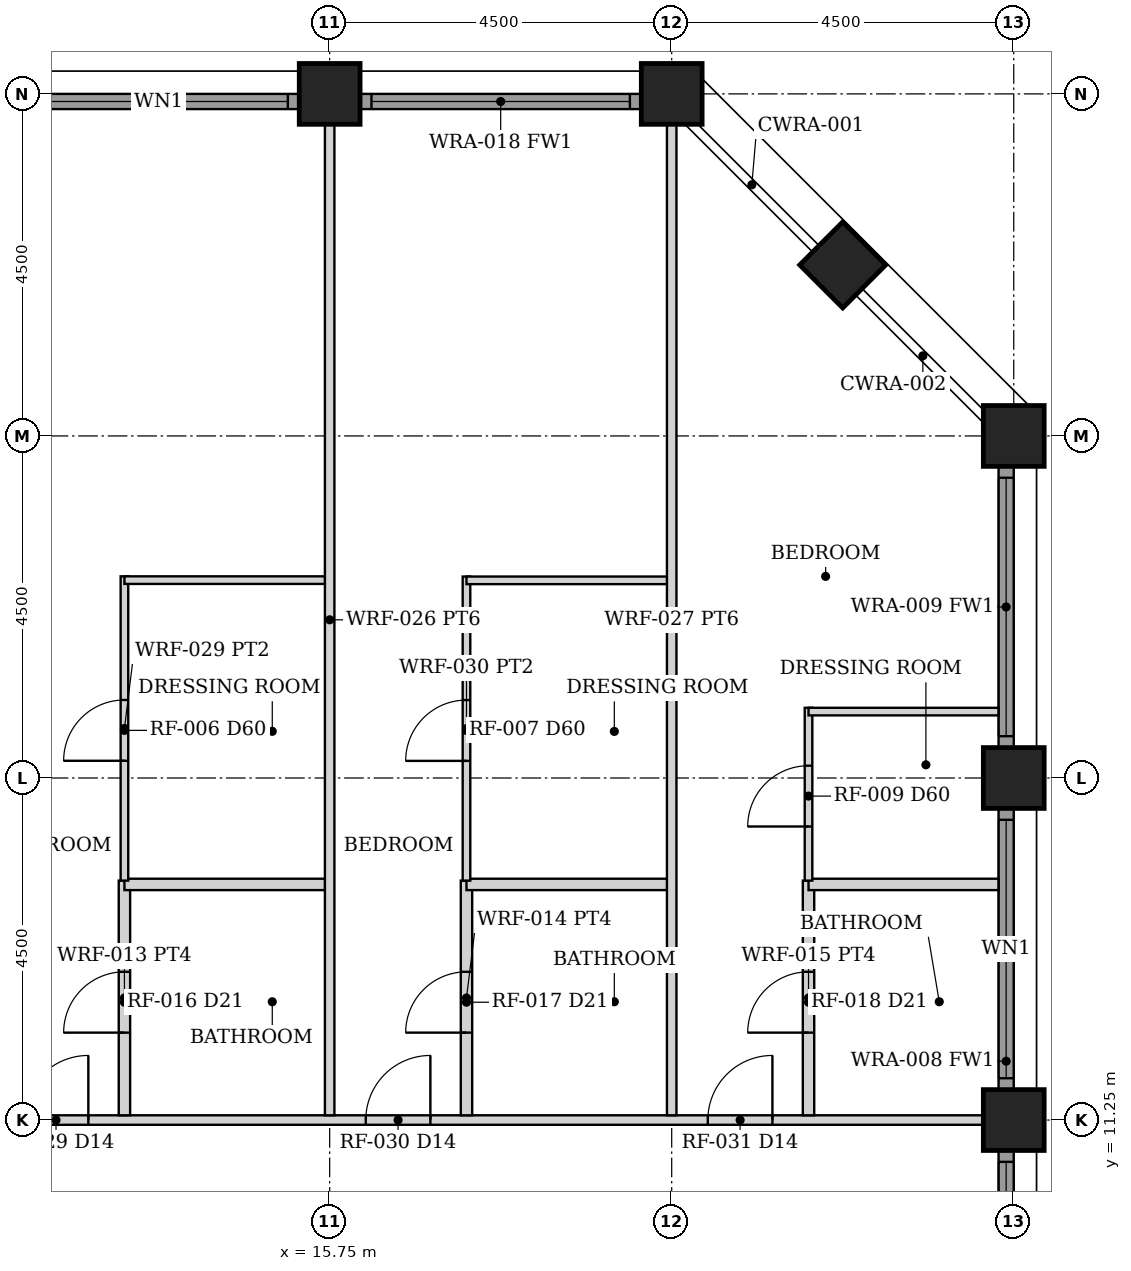
"""IFC4 building model, lengths in metres.
Left out: names, types, materials, properties, quantities, classifications, styles, units other than length and angle.
Written with IfcOpenShell. Run it as: python <this file> out.ifc"""

import sys

from ifc_helpers import new_model, si_unit, direction, frame, frame_2d, origin, origin_2d, place, context, subcontext, project, spatial, rectangle, hollow_rectangle, extrude, element, fill, save


model = new_model("IFC4")
c1 = context("Model", 3, precision=1e-05, world=origin(), true_north=direction((0.0, 1.0)))
c2 = subcontext(c1, "Body", "Model", "MODEL_VIEW")
j1 = project(units=[si_unit("LENGTHUNIT", "METRE"), si_unit("PLANEANGLEUNIT", "RADIAN")], contexts=[c1])
p1 = place(None, origin())
s1 = spatial("IfcSite", under=j1, at=p1, CompositionType="ELEMENT")
p2 = place(p1, origin())
s2 = spatial("IfcBuilding", under=s1, at=p2, CompositionType="ELEMENT")
p3 = place(p2, frame((0.0, 0.0, 79.0)))
s3 = spatial("IfcBuildingStorey", under=s2, at=p3, CompositionType="ELEMENT", Elevation=79.0)
for number, where, z_axis, x_axis in (
    (1, (24.75, 11.25, 0.0), (0.0, 0.0, 1.0), (1.0, 0.0, 0.0)),
    (2, (15.75, 24.75, 0.0), (0.0, 0.0, 1.0), (0.0, 1.0, 0.0)),
    (3, (24.75, 15.75, 0.0), (0.0, 0.0, 1.0), (1.0, 0.0, 0.0)),
    (4, (20.25, 24.75, 0.0), (0.0, 0.0, 1.0), (0.0, 1.0, 0.0)),
    (5, (24.75, 20.25, 0.0), (0.0, 0.0, 1.0), (1.0, 0.0, 0.0)),
    (6, (22.5, 22.5, 0.0), (0.0, 0.0, 1.0), (0.707, 0.707, 0.0)),
):
    element("IfcColumn", number, at=place(p3, frame(where, z_axis=z_axis, x_axis=x_axis)), inside=s3, PredefinedType="COLUMN", context=c2, shape_type="SweptSolid", body=[
        extrude(hollow_rectangle(XDim=0.8, YDim=0.8, WallThickness=0.06, at=origin_2d()), origin(), (0.0, 0.0, 1.0), 3.5),
    ])
p4 = place(p3, frame((24.65, 7.155, 0.0), z_axis=(0.0, 0.0, 1.0), x_axis=(0.0, 1.0, 0.0)))
e7 = element("IfcWall", 7, at=p4, inside=s3, PredefinedType="SOLIDWALL", context=c2, shape_type="SweptSolid", body=[
    extrude(rectangle(XDim=3.69, YDim=0.2, at=frame_2d((1.845, 0.0))), origin(), (0.0, 0.0, 1.0), 2.379),
])
p5 = place(p4, frame((0.145, 0.0, 0.3)))
e8 = element("IfcOpeningElement", 8, at=p5, cuts=e7, PredefinedType="OPENING", context=c2, shape_type="SweptSolid", body=[
    extrude(rectangle(XDim=3.4, YDim=1.929, at=frame_2d((1.7, 0.964))), frame((0.0, 0.11, 0.0), z_axis=(0.0, -1.0, 0.0), x_axis=(1.0, 0.0, 0.0)), (0.0, 0.0, 1.0), 0.22),
])
p6 = place(p3, frame((24.65, 11.655, 0.0), z_axis=(0.0, 0.0, 1.0), x_axis=(0.0, 1.0, 0.0)))
e9 = element("IfcWall", 9, at=p6, inside=s3, PredefinedType="SOLIDWALL", context=c2, shape_type="SweptSolid", body=[
    extrude(rectangle(XDim=3.69, YDim=0.2, at=frame_2d((1.845, 0.0))), origin(), (0.0, 0.0, 1.0), 2.379),
])
p7 = place(p6, frame((0.145, 0.0, 0.3)))
e10 = element("IfcOpeningElement", 10, at=p7, cuts=e9, PredefinedType="OPENING", context=c2, shape_type="SweptSolid", body=[
    extrude(rectangle(XDim=3.4, YDim=1.929, at=frame_2d((1.7, 0.964))), frame((0.0, 0.11, 0.0), z_axis=(0.0, -1.0, 0.0), x_axis=(1.0, 0.0, 0.0)), (0.0, 0.0, 1.0), 0.22),
])
p8 = place(p3, frame((24.65, 16.155, 0.0), z_axis=(0.0, 0.0, 1.0), x_axis=(0.0, 1.0, 0.0)))
e11 = element("IfcWall", 11, at=p8, inside=s3, PredefinedType="SOLIDWALL", context=c2, shape_type="SweptSolid", body=[
    extrude(rectangle(XDim=3.69, YDim=0.2, at=frame_2d((1.845, 0.0))), origin(), (0.0, 0.0, 1.0), 2.379),
])
p9 = place(p8, frame((0.145, 0.0, 0.3)))
e12 = element("IfcOpeningElement", 12, at=p9, cuts=e11, PredefinedType="OPENING", context=c2, shape_type="SweptSolid", body=[
    extrude(rectangle(XDim=3.4, YDim=1.929, at=frame_2d((1.7, 0.964))), frame((0.0, 0.11, 0.0), z_axis=(0.0, -1.0, 0.0), x_axis=(1.0, 0.0, 0.0)), (0.0, 0.0, 1.0), 0.22),
])
p10 = place(p3, frame((11.655, 24.65, 0.0), z_axis=(0.0, 0.0, 1.0), x_axis=(1.0, 0.0, 0.0)))
e13 = element("IfcWall", 13, at=p10, inside=s3, PredefinedType="SOLIDWALL", context=c2, shape_type="SweptSolid", body=[
    extrude(rectangle(XDim=3.69, YDim=0.2, at=frame_2d((1.845, 0.0))), origin(), (0.0, 0.0, 1.0), 2.379),
])
p11 = place(p10, frame((0.145, 0.0, 0.3)))
e14 = element("IfcOpeningElement", 14, at=p11, cuts=e13, PredefinedType="OPENING", context=c2, shape_type="SweptSolid", body=[
    extrude(rectangle(XDim=3.4, YDim=1.929, at=frame_2d((1.7, 0.964))), frame((0.0, 0.11, 0.0), z_axis=(0.0, -1.0, 0.0), x_axis=(1.0, 0.0, 0.0)), (0.0, 0.0, 1.0), 0.22),
])
p12 = place(p3, frame((16.155, 24.65, 0.0), z_axis=(0.0, 0.0, 1.0), x_axis=(1.0, 0.0, 0.0)))
e15 = element("IfcWall", 15, at=p12, inside=s3, PredefinedType="SOLIDWALL", context=c2, shape_type="SweptSolid", body=[
    extrude(rectangle(XDim=3.69, YDim=0.2, at=frame_2d((1.845, 0.0))), origin(), (0.0, 0.0, 1.0), 2.379),
])
p13 = place(p12, frame((0.145, 0.0, 0.3)))
e16 = element("IfcOpeningElement", 16, at=p13, cuts=e15, PredefinedType="OPENING", context=c2, shape_type="SweptSolid", body=[
    extrude(rectangle(XDim=3.4, YDim=1.929, at=frame_2d((1.7, 0.964))), frame((0.0, 0.11, 0.0), z_axis=(0.0, -1.0, 0.0), x_axis=(1.0, 0.0, 0.0)), (0.0, 0.0, 1.0), 0.22),
])
p14 = place(p3, frame((-2.15, 11.25, 0.0), z_axis=(0.0, 0.0, 1.0), x_axis=(1.0, 0.0, 0.0)))
e17 = element("IfcWall", 17, at=p14, inside=s3, PredefinedType="PARTITIONING", context=c2, shape_type="SweptSolid", body=[
    extrude(rectangle(XDim=26.5, YDim=0.125, at=frame_2d((13.25, 0.0))), origin(), (0.0, 0.0, 1.0), 2.373),
])
p15 = place(p14, frame((0.85, 0.0, 0.0)))
e18 = element("IfcOpeningElement", 18, at=p15, cuts=e17, PredefinedType="OPENING", context=c2, shape_type="SweptSolid", body=[
    extrude(rectangle(XDim=0.9, YDim=2.1, at=frame_2d((0.45, 1.05))), frame((0.0, 0.073, 0.0), z_axis=(0.0, -1.0, 0.0), x_axis=(1.0, 0.0, 0.0)), (0.0, 0.0, 1.0), 0.145),
])
p16 = place(p14, frame((5.95, 0.0, 0.0)))
e19 = element("IfcOpeningElement", 19, at=p16, cuts=e17, PredefinedType="OPENING", context=c2, shape_type="SweptSolid", body=[
    extrude(rectangle(XDim=1.4, YDim=2.1, at=frame_2d((0.7, 1.05))), frame((0.0, 0.073, 0.0), z_axis=(0.0, -1.0, 0.0), x_axis=(1.0, 0.0, 0.0)), (0.0, 0.0, 1.0), 0.145),
])
p17 = place(p14, frame((9.375, 0.0, 0.0)))
e20 = element("IfcOpeningElement", 20, at=p17, cuts=e17, PredefinedType="OPENING", context=c2, shape_type="SweptSolid", body=[
    extrude(rectangle(XDim=0.85, YDim=2.1, at=frame_2d((0.425, 1.05))), frame((0.0, 0.073, 0.0), z_axis=(0.0, -1.0, 0.0), x_axis=(1.0, 0.0, 0.0)), (0.0, 0.0, 1.0), 0.145),
])
p18 = place(p14, frame((11.57, 0.0, 0.0)))
e21 = element("IfcOpeningElement", 21, at=p18, cuts=e17, PredefinedType="OPENING", context=c2, shape_type="SweptSolid", body=[
    extrude(rectangle(XDim=0.9, YDim=2.1, at=frame_2d((0.45, 1.05))), frame((0.0, 0.073, 0.0), z_axis=(0.0, -1.0, 0.0), x_axis=(1.0, 0.0, 0.0)), (0.0, 0.0, 1.0), 0.145),
])
p19 = place(p14, frame((13.875, 0.0, 0.0)))
e22 = element("IfcOpeningElement", 22, at=p19, cuts=e17, PredefinedType="OPENING", context=c2, shape_type="SweptSolid", body=[
    extrude(rectangle(XDim=0.85, YDim=2.1, at=frame_2d((0.425, 1.05))), frame((0.0, 0.073, 0.0), z_axis=(0.0, -1.0, 0.0), x_axis=(1.0, 0.0, 0.0)), (0.0, 0.0, 1.0), 0.145),
])
p20 = place(p14, frame((18.375, 0.0, 0.0)))
e23 = element("IfcOpeningElement", 23, at=p20, cuts=e17, PredefinedType="OPENING", context=c2, shape_type="SweptSolid", body=[
    extrude(rectangle(XDim=0.85, YDim=2.1, at=frame_2d((0.425, 1.05))), frame((0.0, 0.073, 0.0), z_axis=(0.0, -1.0, 0.0), x_axis=(1.0, 0.0, 0.0)), (0.0, 0.0, 1.0), 0.145),
])
p21 = place(p14, frame((22.875, 0.0, 0.0)))
e24 = element("IfcOpeningElement", 24, at=p21, cuts=e17, PredefinedType="OPENING", context=c2, shape_type="SweptSolid", body=[
    extrude(rectangle(XDim=0.85, YDim=2.1, at=frame_2d((0.425, 1.05))), frame((0.0, 0.073, 0.0), z_axis=(0.0, -1.0, 0.0), x_axis=(1.0, 0.0, 0.0)), (0.0, 0.0, 1.0), 0.145),
])
p22 = place(p3, frame((13.05, 11.312, 0.0), z_axis=(0.0, 0.0, 1.0), x_axis=(0.0, 1.0, 0.0)))
e25 = element("IfcWall", 25, at=p22, inside=s3, PredefinedType="PARTITIONING", context=c2, shape_type="SweptSolid", body=[
    extrude(rectangle(XDim=3.087, YDim=0.15, at=frame_2d((1.544, 0.0))), origin(), (0.0, 0.0, 1.0), 2.373),
])
p23 = place(p22, frame((1.087, 0.0, 0.0)))
e26 = element("IfcOpeningElement", 26, at=p23, cuts=e25, PredefinedType="OPENING", context=c2, shape_type="SweptSolid", body=[
    extrude(rectangle(XDim=0.8, YDim=2.1, at=frame_2d((0.4, 1.05))), frame((0.0, 0.085, 0.0), z_axis=(0.0, -1.0, 0.0), x_axis=(1.0, 0.0, 0.0)), (0.0, 0.0, 1.0), 0.17),
])
p24 = place(p3, frame((13.05, 14.35, 0.0), z_axis=(0.0, 0.0, 1.0), x_axis=(1.0, 0.0, 0.0)))
e27 = element("IfcWall", 27, at=p24, inside=s3, PredefinedType="PARTITIONING", context=c2, shape_type="SweptSolid", body=[
    extrude(rectangle(XDim=2.64, YDim=0.15, at=frame_2d((1.32, 0.0))), origin(), (0.0, 0.0, 1.0), 2.373),
])
p25 = place(p3, frame((13.05, 14.4, 0.0), z_axis=(0.0, 0.0, 1.0), x_axis=(0.0, 1.0, 0.0)))
e28 = element("IfcWall", 28, at=p25, inside=s3, PredefinedType="PARTITIONING", context=c2, shape_type="SweptSolid", body=[
    extrude(rectangle(XDim=4.003, YDim=0.1, at=frame_2d((2.001, 0.0))), origin(), (0.0, 0.0, 1.0), 2.373),
])
p26 = place(p25, frame((1.576, 0.0, 0.0)))
e29 = element("IfcOpeningElement", 29, at=p26, cuts=e28, PredefinedType="OPENING", context=c2, shape_type="SweptSolid", body=[
    extrude(rectangle(XDim=0.8, YDim=2.1, at=frame_2d((0.4, 1.05))), frame((0.0, 0.06, 0.0), z_axis=(0.0, -1.0, 0.0), x_axis=(1.0, 0.0, 0.0)), (0.0, 0.0, 1.0), 0.12),
])
p27 = place(p3, frame((13.05, 18.353, 0.0), z_axis=(0.0, 0.0, 1.0), x_axis=(1.0, 0.0, 0.0)))
e30 = element("IfcWall", 30, at=p27, inside=s3, PredefinedType="PARTITIONING", context=c2, shape_type="SweptSolid", body=[
    extrude(rectangle(XDim=2.64, YDim=0.1, at=frame_2d((1.32, 0.0))), origin(), (0.0, 0.0, 1.0), 2.373),
])
p28 = place(p3, frame((15.75, 11.312, 0.0), z_axis=(0.0, 0.0, 1.0), x_axis=(0.0, 1.0, 0.0)))
e31 = element("IfcWall", 31, at=p28, inside=s3, PredefinedType="PARTITIONING", context=c2, shape_type="SweptSolid", body=[
    extrude(rectangle(XDim=13.038, YDim=0.125, at=frame_2d((6.519, 0.0))), origin(), (0.0, 0.0, 1.0), 2.373),
])
p29 = place(p3, frame((17.55, 11.312, 0.0), z_axis=(0.0, 0.0, 1.0), x_axis=(0.0, 1.0, 0.0)))
e32 = element("IfcWall", 32, at=p29, inside=s3, PredefinedType="PARTITIONING", context=c2, shape_type="SweptSolid", body=[
    extrude(rectangle(XDim=3.087, YDim=0.15, at=frame_2d((1.544, 0.0))), origin(), (0.0, 0.0, 1.0), 2.373),
])
p30 = place(p29, frame((1.087, 0.0, 0.0)))
e33 = element("IfcOpeningElement", 33, at=p30, cuts=e32, PredefinedType="OPENING", context=c2, shape_type="SweptSolid", body=[
    extrude(rectangle(XDim=0.8, YDim=2.1, at=frame_2d((0.4, 1.05))), frame((0.0, 0.085, 0.0), z_axis=(0.0, -1.0, 0.0), x_axis=(1.0, 0.0, 0.0)), (0.0, 0.0, 1.0), 0.17),
])
p31 = place(p3, frame((17.55, 14.35, 0.0), z_axis=(0.0, 0.0, 1.0), x_axis=(1.0, 0.0, 0.0)))
e34 = element("IfcWall", 34, at=p31, inside=s3, PredefinedType="PARTITIONING", context=c2, shape_type="SweptSolid", body=[
    extrude(rectangle(XDim=2.64, YDim=0.15, at=frame_2d((1.32, 0.0))), origin(), (0.0, 0.0, 1.0), 2.373),
])
p32 = place(p3, frame((17.55, 14.4, 0.0), z_axis=(0.0, 0.0, 1.0), x_axis=(0.0, 1.0, 0.0)))
e35 = element("IfcWall", 35, at=p32, inside=s3, PredefinedType="PARTITIONING", context=c2, shape_type="SweptSolid", body=[
    extrude(rectangle(XDim=4.0, YDim=0.1, at=frame_2d((2.0, 0.0))), origin(), (0.0, 0.0, 1.0), 2.373),
])
p33 = place(p32, frame((1.575, 0.0, 0.0)))
e36 = element("IfcOpeningElement", 36, at=p33, cuts=e35, PredefinedType="OPENING", context=c2, shape_type="SweptSolid", body=[
    extrude(rectangle(XDim=0.8, YDim=2.1, at=frame_2d((0.4, 1.05))), frame((0.0, 0.06, 0.0), z_axis=(0.0, -1.0, 0.0), x_axis=(1.0, 0.0, 0.0)), (0.0, 0.0, 1.0), 0.12),
])
p34 = place(p3, frame((17.55, 18.35, 0.0), z_axis=(0.0, 0.0, 1.0), x_axis=(1.0, 0.0, 0.0)))
e37 = element("IfcWall", 37, at=p34, inside=s3, PredefinedType="PARTITIONING", context=c2, shape_type="SweptSolid", body=[
    extrude(rectangle(XDim=2.64, YDim=0.1, at=frame_2d((1.32, 0.0))), origin(), (0.0, 0.0, 1.0), 2.373),
])
p35 = place(p3, frame((20.25, 11.312, 0.0), z_axis=(0.0, 0.0, 1.0), x_axis=(0.0, 1.0, 0.0)))
e38 = element("IfcWall", 38, at=p35, inside=s3, PredefinedType="PARTITIONING", context=c2, shape_type="SweptSolid", body=[
    extrude(rectangle(XDim=13.038, YDim=0.125, at=frame_2d((6.519, 0.0))), origin(), (0.0, 0.0, 1.0), 2.373),
])
p36 = place(p3, frame((22.05, 11.312, 0.0), z_axis=(0.0, 0.0, 1.0), x_axis=(0.0, 1.0, 0.0)))
e39 = element("IfcWall", 39, at=p36, inside=s3, PredefinedType="PARTITIONING", context=c2, shape_type="SweptSolid", body=[
    extrude(rectangle(XDim=3.087, YDim=0.15, at=frame_2d((1.544, 0.0))), origin(), (0.0, 0.0, 1.0), 2.373),
])
p37 = place(p36, frame((1.087, 0.0, 0.0)))
e40 = element("IfcOpeningElement", 40, at=p37, cuts=e39, PredefinedType="OPENING", context=c2, shape_type="SweptSolid", body=[
    extrude(rectangle(XDim=0.8, YDim=2.1, at=frame_2d((0.4, 1.05))), frame((0.0, 0.085, 0.0), z_axis=(0.0, -1.0, 0.0), x_axis=(1.0, 0.0, 0.0)), (0.0, 0.0, 1.0), 0.17),
])
p38 = place(p3, frame((22.05, 14.35, 0.0), z_axis=(0.0, 0.0, 1.0), x_axis=(1.0, 0.0, 0.0)))
e41 = element("IfcWall", 41, at=p38, inside=s3, PredefinedType="PARTITIONING", context=c2, shape_type="SweptSolid", body=[
    extrude(rectangle(XDim=2.5, YDim=0.15, at=frame_2d((1.25, 0.0))), origin(), (0.0, 0.0, 1.0), 2.373),
])
p39 = place(p3, frame((22.05, 14.4, 0.0), z_axis=(0.0, 0.0, 1.0), x_axis=(0.0, 1.0, 0.0)))
e42 = element("IfcWall", 42, at=p39, inside=s3, PredefinedType="PARTITIONING", context=c2, shape_type="SweptSolid", body=[
    extrude(rectangle(XDim=2.274, YDim=0.1, at=frame_2d((1.137, 0.0))), origin(), (0.0, 0.0, 1.0), 2.373),
])
p40 = place(p39, frame((0.712, 0.0, 0.0)))
e43 = element("IfcOpeningElement", 43, at=p40, cuts=e42, PredefinedType="OPENING", context=c2, shape_type="SweptSolid", body=[
    extrude(rectangle(XDim=0.8, YDim=2.1, at=frame_2d((0.4, 1.05))), frame((0.0, 0.06, 0.0), z_axis=(0.0, -1.0, 0.0), x_axis=(1.0, 0.0, 0.0)), (0.0, 0.0, 1.0), 0.12),
])
p41 = place(p3, frame((22.05, 16.624, 0.0), z_axis=(0.0, 0.0, 1.0), x_axis=(1.0, 0.0, 0.0)))
e44 = element("IfcWall", 44, at=p41, inside=s3, PredefinedType="PARTITIONING", context=c2, shape_type="SweptSolid", body=[
    extrude(rectangle(XDim=2.5, YDim=0.1, at=frame_2d((1.25, 0.0))), origin(), (0.0, 0.0, 1.0), 2.373),
])
p42 = place(p5, origin())
e45 = element("IfcWindow", 45, at=p42, inside=s3, PartitioningType="SINGLE_PANEL", PredefinedType="WINDOW", context=c2, shape_type="SweptSolid", body=[
    extrude(rectangle(XDim=3.4, YDim=1.929, at=frame_2d((1.7, 0.964))), frame((0.0, 0.03, 0.0), z_axis=(0.0, -1.0, 0.0), x_axis=(1.0, 0.0, 0.0)), (0.0, 0.0, 1.0), 0.06),
])
fill(e8, e45)
p43 = place(p7, origin())
e46 = element("IfcWindow", 46, at=p43, inside=s3, PartitioningType="SINGLE_PANEL", PredefinedType="WINDOW", context=c2, shape_type="SweptSolid", body=[
    extrude(rectangle(XDim=3.4, YDim=1.929, at=frame_2d((1.7, 0.964))), frame((0.0, 0.03, 0.0), z_axis=(0.0, -1.0, 0.0), x_axis=(1.0, 0.0, 0.0)), (0.0, 0.0, 1.0), 0.06),
])
fill(e10, e46)
p44 = place(p9, origin())
e47 = element("IfcWindow", 47, at=p44, inside=s3, PartitioningType="SINGLE_PANEL", PredefinedType="WINDOW", context=c2, shape_type="SweptSolid", body=[
    extrude(rectangle(XDim=3.4, YDim=1.929, at=frame_2d((1.7, 0.964))), frame((0.0, 0.03, 0.0), z_axis=(0.0, -1.0, 0.0), x_axis=(1.0, 0.0, 0.0)), (0.0, 0.0, 1.0), 0.06),
])
fill(e12, e47)
p45 = place(p11, origin())
e48 = element("IfcWindow", 48, at=p45, inside=s3, PartitioningType="SINGLE_PANEL", PredefinedType="WINDOW", context=c2, shape_type="SweptSolid", body=[
    extrude(rectangle(XDim=3.4, YDim=1.929, at=frame_2d((1.7, 0.964))), frame((0.0, 0.03, 0.0), z_axis=(0.0, -1.0, 0.0), x_axis=(1.0, 0.0, 0.0)), (0.0, 0.0, 1.0), 0.06),
])
fill(e14, e48)
p46 = place(p13, origin())
e49 = element("IfcWindow", 49, at=p46, inside=s3, PartitioningType="SINGLE_PANEL", PredefinedType="WINDOW", context=c2, shape_type="SweptSolid", body=[
    extrude(rectangle(XDim=3.4, YDim=1.929, at=frame_2d((1.7, 0.964))), frame((0.0, 0.03, 0.0), z_axis=(0.0, -1.0, 0.0), x_axis=(1.0, 0.0, 0.0)), (0.0, 0.0, 1.0), 0.06),
])
fill(e16, e49)
p47 = place(p19, origin())
e50 = element("IfcDoor", 50, at=p47, inside=s3, OperationType="SINGLE_SWING_RIGHT", PredefinedType="DOOR", context=c2, shape_type="SweptSolid", body=[
    extrude(rectangle(XDim=0.85, YDim=2.1, at=frame_2d((0.425, 1.05))), frame((0.0, 0.025, 0.0), z_axis=(0.0, -1.0, 0.0), x_axis=(1.0, 0.0, 0.0)), (0.0, 0.0, 1.0), 0.05),
])
fill(e22, e50)
p48 = place(p23, origin())
e51 = element("IfcDoor", 51, at=p48, inside=s3, OperationType="SINGLE_SWING_LEFT", PredefinedType="DOOR", context=c2, shape_type="SweptSolid", body=[
    extrude(rectangle(XDim=0.8, YDim=2.1, at=frame_2d((0.4, 1.05))), frame((0.0, 0.025, 0.0), z_axis=(0.0, -1.0, 0.0), x_axis=(1.0, 0.0, 0.0)), (0.0, 0.0, 1.0), 0.05),
])
fill(e26, e51)
p49 = place(p26, origin())
e52 = element("IfcDoor", 52, at=p49, inside=s3, OperationType="SINGLE_SWING_LEFT", PredefinedType="DOOR", context=c2, shape_type="SweptSolid", body=[
    extrude(rectangle(XDim=0.8, YDim=2.1, at=frame_2d((0.4, 1.05))), frame((0.0, 0.025, 0.0), z_axis=(0.0, -1.0, 0.0), x_axis=(1.0, 0.0, 0.0)), (0.0, 0.0, 1.0), 0.05),
])
fill(e29, e52)
p50 = place(p20, origin())
e53 = element("IfcDoor", 53, at=p50, inside=s3, OperationType="SINGLE_SWING_RIGHT", PredefinedType="DOOR", context=c2, shape_type="SweptSolid", body=[
    extrude(rectangle(XDim=0.85, YDim=2.1, at=frame_2d((0.425, 1.05))), frame((0.0, 0.025, 0.0), z_axis=(0.0, -1.0, 0.0), x_axis=(1.0, 0.0, 0.0)), (0.0, 0.0, 1.0), 0.05),
])
fill(e23, e53)
p51 = place(p30, origin())
e54 = element("IfcDoor", 54, at=p51, inside=s3, OperationType="SINGLE_SWING_LEFT", PredefinedType="DOOR", context=c2, shape_type="SweptSolid", body=[
    extrude(rectangle(XDim=0.8, YDim=2.1, at=frame_2d((0.4, 1.05))), frame((0.0, 0.025, 0.0), z_axis=(0.0, -1.0, 0.0), x_axis=(1.0, 0.0, 0.0)), (0.0, 0.0, 1.0), 0.05),
])
fill(e33, e54)
p52 = place(p33, origin())
e55 = element("IfcDoor", 55, at=p52, inside=s3, OperationType="SINGLE_SWING_LEFT", PredefinedType="DOOR", context=c2, shape_type="SweptSolid", body=[
    extrude(rectangle(XDim=0.8, YDim=2.1, at=frame_2d((0.4, 1.05))), frame((0.0, 0.025, 0.0), z_axis=(0.0, -1.0, 0.0), x_axis=(1.0, 0.0, 0.0)), (0.0, 0.0, 1.0), 0.05),
])
fill(e36, e55)
p53 = place(p21, origin())
e56 = element("IfcDoor", 56, at=p53, inside=s3, OperationType="SINGLE_SWING_RIGHT", PredefinedType="DOOR", context=c2, shape_type="SweptSolid", body=[
    extrude(rectangle(XDim=0.85, YDim=2.1, at=frame_2d((0.425, 1.05))), frame((0.0, 0.025, 0.0), z_axis=(0.0, -1.0, 0.0), x_axis=(1.0, 0.0, 0.0)), (0.0, 0.0, 1.0), 0.05),
])
fill(e24, e56)
p54 = place(p37, origin())
e57 = element("IfcDoor", 57, at=p54, inside=s3, OperationType="SINGLE_SWING_LEFT", PredefinedType="DOOR", context=c2, shape_type="SweptSolid", body=[
    extrude(rectangle(XDim=0.8, YDim=2.1, at=frame_2d((0.4, 1.05))), frame((0.0, 0.025, 0.0), z_axis=(0.0, -1.0, 0.0), x_axis=(1.0, 0.0, 0.0)), (0.0, 0.0, 1.0), 0.05),
])
fill(e40, e57)
p55 = place(p40, origin())
e58 = element("IfcDoor", 58, at=p55, inside=s3, OperationType="SINGLE_SWING_LEFT", PredefinedType="DOOR", context=c2, shape_type="SweptSolid", body=[
    extrude(rectangle(XDim=0.8, YDim=2.1, at=frame_2d((0.4, 1.05))), frame((0.0, 0.025, 0.0), z_axis=(0.0, -1.0, 0.0), x_axis=(1.0, 0.0, 0.0)), (0.0, 0.0, 1.0), 0.05),
])
fill(e43, e58)
save(model, sys.argv[1])
